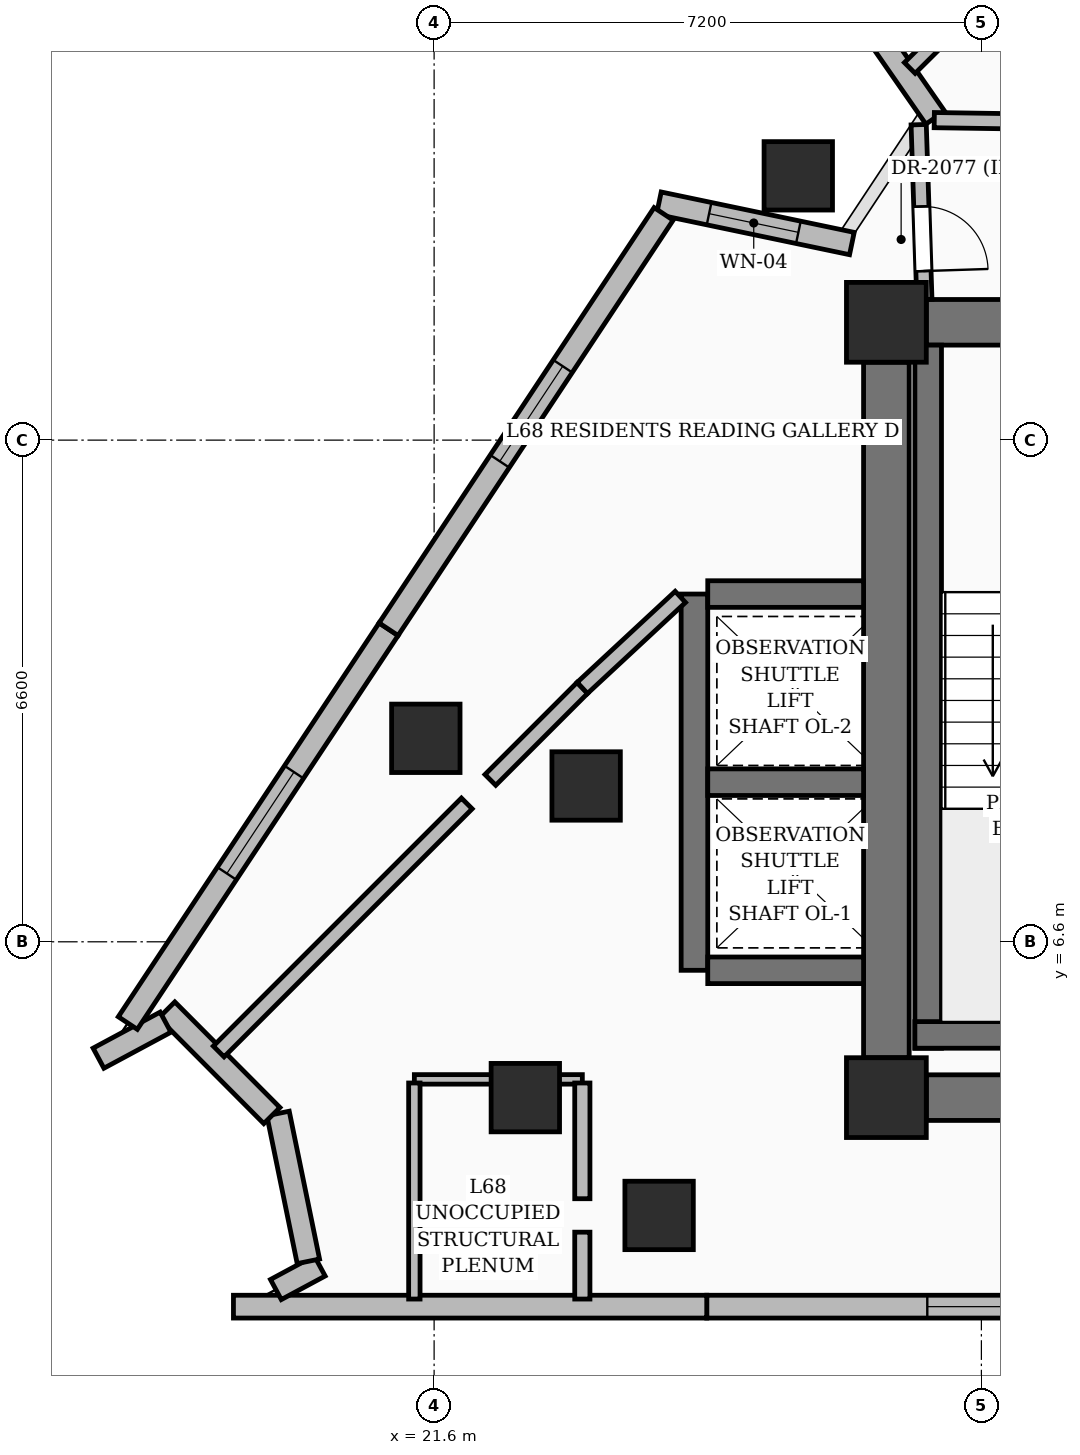
"""IFC4 building model, lengths in metres.
Left out: names, types, materials, properties, quantities, classifications, styles, units other than length and angle.
Written with IfcOpenShell. Run it as: python <this file> out.ifc"""

import sys

from ifc_helpers import new_model, si_unit, direction, frame, frame_2d, origin, origin_2d, place, context, subcontext, project, spatial, rectangle, extrude, element, fill, save


model = new_model("IFC4")
c1 = context("Model", 3, precision=1e-05, world=origin(), true_north=direction((0.0, 1.0)))
c2 = subcontext(c1, "Body", "Model", "MODEL_VIEW")
j1 = project(units=[si_unit("LENGTHUNIT", "METRE"), si_unit("PLANEANGLEUNIT", "RADIAN")], contexts=[c1])
p1 = place(None, origin())
s1 = spatial("IfcSite", under=j1, at=p1, CompositionType="ELEMENT")
p2 = place(p1, origin())
s2 = spatial("IfcBuilding", under=s1, at=p2, CompositionType="ELEMENT")
p3 = place(p2, frame((0.0, 0.0, 263.25)))
s3 = spatial("IfcBuildingStorey", under=s2, at=p3, CompositionType="ELEMENT", Elevation=263.25)
for number, where, z_axis, x_axis in (
    (1, (27.55, 4.55, 0.0), (0.0, 0.0, 1.0), (1.0, 0.0, 0.0)),
    (2, (27.55, 14.75, 0.0), (0.0, 0.0, 1.0), (1.0, 0.0, 0.0)),
):
    element("IfcColumn", number, at=place(p3, frame(where, z_axis=z_axis, x_axis=x_axis)), inside=s3, PredefinedType="COLUMN", context=c2, shape_type="SweptSolid", body=[
        extrude(rectangle(XDim=1.05, YDim=1.05, at=origin_2d()), origin(), (0.0, 0.0, 1.0), 3.75),
    ])
for number, where, z_axis, x_axis in (
    (3, (22.8, 4.55, 0.0), (0.0, 0.0, 1.0), (1.0, 0.0, 0.0)),
    (4, (23.6, 8.65, 0.0), (0.0, 0.0, 1.0), (1.0, 0.0, 0.0)),
):
    element("IfcColumn", number, at=place(p3, frame(where, z_axis=z_axis, x_axis=x_axis)), inside=s3, PredefinedType="COLUMN", context=c2, shape_type="SweptSolid", body=[
        extrude(rectangle(XDim=0.9, YDim=0.9, at=origin_2d()), origin(), (0.0, 0.0, 1.0), 3.75),
    ])
p4 = place(p3, frame((28.075, 4.55, 0.0), z_axis=(0.0, 0.0, 1.0), x_axis=(1.0, 0.0, 0.0)))
e5 = element("IfcWall", 5, at=p4, inside=s3, PredefinedType="SHEAR", context=c2, shape_type="SweptSolid", body=[
    extrude(rectangle(XDim=6.55, YDim=0.6, at=frame_2d((3.275, 0.0))), origin(), (0.0, 0.0, 1.0), 3.75),
])
p5 = place(p3, frame((28.075, 14.75, 0.0), z_axis=(0.0, 0.0, 1.0), x_axis=(1.0, 0.0, 0.0)))
e6 = element("IfcWall", 6, at=p5, inside=s3, PredefinedType="SHEAR", context=c2, shape_type="SweptSolid", body=[
    extrude(rectangle(XDim=6.55, YDim=0.6, at=frame_2d((3.275, 0.0))), origin(), (0.0, 0.0, 1.0), 3.75),
])
p6 = place(p5, frame((1.1, 0.0, 0.0)))
e7 = element("IfcOpeningElement", 7, at=p6, cuts=e6, PredefinedType="OPENING", context=c2, shape_type="SweptSolid", body=[
    extrude(rectangle(XDim=1.05, YDim=2.15, at=frame_2d((0.525, 1.075))), frame((0.0, 0.31, 0.0), z_axis=(0.0, -1.0, 0.0), x_axis=(1.0, 0.0, 0.0)), (0.0, 0.0, 1.0), 0.62),
])
p7 = place(p5, frame((4.95, 0.0, 0.0)))
e8 = element("IfcOpeningElement", 8, at=p7, cuts=e6, PredefinedType="OPENING", context=c2, shape_type="SweptSolid", body=[
    extrude(rectangle(XDim=0.95, YDim=2.15, at=frame_2d((0.475, 1.075))), frame((0.0, 0.31, 0.0), z_axis=(0.0, -1.0, 0.0), x_axis=(1.0, 0.0, 0.0)), (0.0, 0.0, 1.0), 0.62),
])
p8 = place(p3, frame((27.55, 5.075, 0.0), z_axis=(0.0, 0.0, 1.0), x_axis=(0.0, 1.0, 0.0)))
e9 = element("IfcWall", 9, at=p8, inside=s3, PredefinedType="SHEAR", context=c2, shape_type="SweptSolid", body=[
    extrude(rectangle(XDim=9.15, YDim=0.6, at=frame_2d((4.575, 0.0))), origin(), (0.0, 0.0, 1.0), 3.75),
])
p9 = place(p3, frame((28.1, 5.2, 0.0), z_axis=(0.0, 0.0, 1.0), x_axis=(0.0, 1.0, 0.0)))
e10 = element("IfcWall", 10, at=p9, inside=s3, PredefinedType="SOLIDWALL", context=c2, shape_type="SweptSolid", body=[
    extrude(rectangle(XDim=9.25, YDim=0.35, at=frame_2d((4.625, 0.0))), origin(), (0.0, 0.0, 1.0), 3.75),
])
p10 = place(p3, frame((27.925, 5.375, 0.0), z_axis=(0.0, 0.0, 1.0), x_axis=(1.0, 0.0, 0.0)))
e11 = element("IfcWall", 11, at=p10, inside=s3, PredefinedType="SOLIDWALL", context=c2, shape_type="SweptSolid", body=[
    extrude(rectangle(XDim=3.55, YDim=0.35, at=frame_2d((1.775, 0.0))), origin(), (0.0, 0.0, 1.0), 3.75),
])
p11 = place(p3, frame((25.025, 6.225, 0.0), z_axis=(0.0, 0.0, 1.0), x_axis=(0.0, 1.0, 0.0)))
e12 = element("IfcWall", 12, at=p11, inside=s3, PredefinedType="SOLIDWALL", context=c2, shape_type="SweptSolid", body=[
    extrude(rectangle(XDim=4.95, YDim=0.35, at=frame_2d((2.475, 0.0))), origin(), (0.0, 0.0, 1.0), 3.75),
])
for number, where, z_axis, x_axis in (
    (13, (25.2, 6.225, 0.0), (0.0, 0.0, 1.0), (1.0, 0.0, 0.0)),
    (14, (25.2, 8.7, 0.0), (0.0, 0.0, 1.0), (1.0, 0.0, 0.0)),
    (15, (25.2, 11.175, 0.0), (0.0, 0.0, 1.0), (1.0, 0.0, 0.0)),
):
    element("IfcWall", number, at=place(p3, frame(where, z_axis=z_axis, x_axis=x_axis)), inside=s3, PredefinedType="SOLIDWALL", context=c2, shape_type="SweptSolid", body=[
        extrude(rectangle(XDim=2.05, YDim=0.35, at=frame_2d((1.025, 0.0))), origin(), (0.0, 0.0, 1.0), 3.75),
    ])
for number, where, z_axis, x_axis in (
    (16, (24.56, 3.0, 0.0), (0.0, 0.0, 1.0), (1.0, 0.0, 0.0)),
    (17, (26.391, 16.677, 0.0), (0.0, 0.0, 1.0), (1.0, 0.0, 0.0)),
    (18, (21.491, 9.277, 0.0), (0.0, 0.0, 1.0), (1.0, 0.0, 0.0)),
):
    element("IfcColumn", number, at=place(p3, frame(where, z_axis=z_axis, x_axis=x_axis)), inside=s3, PredefinedType="COLUMN", context=c2, shape_type="SweptSolid", body=[
        extrude(rectangle(XDim=0.9, YDim=0.9, at=origin_2d()), origin(), (0.0, 0.0, 1.0), 3.75),
    ])
p12 = place(p3, frame((24.557, 16.318, 0.0), z_axis=(0.0, 0.0, 1.0), x_axis=(0.978804667181, -0.204796053441, 0.0)))
e19 = element("IfcWall", 19, at=p12, inside=s3, PredefinedType="SOLIDWALL", context=c2, shape_type="SweptSolid", body=[
    extrude(rectangle(XDim=2.594, YDim=0.3, at=frame_2d((1.297, 0.0))), origin(), (0.0, 0.0, 1.0), 2.825),
])
p13 = place(p12, frame((0.675, 0.0, 0.8)))
e20 = element("IfcOpeningElement", 20, at=p13, cuts=e19, PredefinedType="OPENING", context=c2, shape_type="SweptSolid", body=[
    extrude(rectangle(XDim=1.2, YDim=1.8, at=frame_2d((0.6, 0.9))), frame((0.0, 0.16, 0.0), z_axis=(0.0, -1.0, 0.0), x_axis=(1.0, 0.0, 0.0)), (0.0, 0.0, 1.0), 0.32),
])
p14 = place(p3, frame((28.193, 17.443, 0.0), z_axis=(0.0, 0.0, 1.0), x_axis=(-0.570819039355, 0.821075894367, 0.0)))
e21 = element("IfcWall", 21, at=p14, inside=s3, PredefinedType="SOLIDWALL", context=c2, shape_type="SweptSolid", body=[
    extrude(rectangle(XDim=2.594, YDim=0.3, at=frame_2d((1.297, 0.0))), origin(), (0.0, 0.0, 1.0), 2.825),
])
p15 = place(p3, frame((31.413, 1.8, 0.0), z_axis=(0.0, 0.0, 1.0), x_axis=(-1.0, 0.0, 0.0)))
e22 = element("IfcWall", 22, at=p15, inside=s3, PredefinedType="SOLIDWALL", context=c2, shape_type="SweptSolid", body=[
    extrude(rectangle(XDim=6.227, YDim=0.3, at=frame_2d((3.113, 0.0))), origin(), (0.0, 0.0, 1.0), 3.5),
])
p16 = place(p15, frame((1.725, 0.0, 0.55)))
e23 = element("IfcOpeningElement", 23, at=p16, cuts=e22, PredefinedType="OPENING", context=c2, shape_type="SweptSolid", body=[
    extrude(rectangle(XDim=1.6, YDim=2.2, at=frame_2d((0.8, 1.1))), frame((0.0, 0.16, 0.0), z_axis=(0.0, -1.0, 0.0), x_axis=(1.0, 0.0, 0.0)), (0.0, 0.0, 1.0), 0.32),
])
p17 = place(p3, frame((25.187, 1.8, 0.0), z_axis=(0.0, 0.0, 1.0), x_axis=(-1.0, 0.0, 0.0)))
e24 = element("IfcWall", 24, at=p17, inside=s3, PredefinedType="SOLIDWALL", context=c2, shape_type="SweptSolid", body=[
    extrude(rectangle(XDim=6.227, YDim=0.3, at=frame_2d((3.113, 0.0))), origin(), (0.0, 0.0, 1.0), 3.5),
])
p18 = place(p3, frame((19.518, 2.025, 0.0), z_axis=(0.0, 0.0, 1.0), x_axis=(0.8806864219, 0.47369972164, 0.0)))
e25 = element("IfcWall", 25, at=p18, inside=s3, PredefinedType="SOLIDWALL", context=c2, shape_type="SweptSolid", body=[
    extrude(rectangle(XDim=0.655, YDim=0.3, at=frame_2d((0.328, 0.0))), origin(), (0.0, 0.0, 1.0), 3.5),
])
p19 = place(p3, frame((19.946, 2.396, 0.0), z_axis=(0.0, 0.0, 1.0), x_axis=(-0.200962300898, 0.979598975917, 0.0)))
e26 = element("IfcWall", 26, at=p19, inside=s3, PredefinedType="SOLIDWALL", context=c2, shape_type="SweptSolid", body=[
    extrude(rectangle(XDim=1.985, YDim=0.3, at=frame_2d((0.993, 0.0))), origin(), (0.0, 0.0, 1.0), 3.5),
])
p20 = place(p3, frame((19.466, 4.314, 0.0), z_axis=(0.0, 0.0, 1.0), x_axis=(-0.705548527825, 0.708661608163, 0.0)))
e27 = element("IfcWall", 27, at=p20, inside=s3, PredefinedType="SOLIDWALL", context=c2, shape_type="SweptSolid", body=[
    extrude(rectangle(XDim=1.961, YDim=0.3, at=frame_2d((0.98, 0.0))), origin(), (0.0, 0.0, 1.0), 3.5),
])
p21 = place(p3, frame((18.066, 5.542, 0.0), z_axis=(0.0, 0.0, 1.0), x_axis=(-0.880815496191, -0.473459672696, 0.0)))
e28 = element("IfcWall", 28, at=p21, inside=s3, PredefinedType="SOLIDWALL", context=c2, shape_type="SweptSolid", body=[
    extrude(rectangle(XDim=1.001, YDim=0.3, at=frame_2d((0.5, 0.0))), origin(), (0.0, 0.0, 1.0), 3.5),
])
p22 = place(p3, frame((17.57, 5.531, 0.0), z_axis=(0.0, 0.0, 1.0), x_axis=(0.552104356314, 0.833775017459, 0.0)))
e29 = element("IfcWall", 29, at=p22, inside=s3, PredefinedType="SOLIDWALL", context=c2, shape_type="SweptSolid", body=[
    extrude(rectangle(XDim=6.214, YDim=0.3, at=frame_2d((3.107, 0.0))), origin(), (0.0, 0.0, 1.0), 3.5),
])
p23 = place(p22, frame((2.36, 0.0, 0.55)))
e30 = element("IfcOpeningElement", 30, at=p23, cuts=e29, PredefinedType="OPENING", context=c2, shape_type="SweptSolid", body=[
    extrude(rectangle(XDim=1.6, YDim=2.2, at=frame_2d((0.8, 1.1))), frame((0.0, 0.16, 0.0), z_axis=(0.0, -1.0, 0.0), x_axis=(1.0, 0.0, 0.0)), (0.0, 0.0, 1.0), 0.32),
])
p24 = place(p3, frame((21.001, 10.712, 0.0), z_axis=(0.0, 0.0, 1.0), x_axis=(0.552092793922, 0.833782673662, 0.0)))
e31 = element("IfcWall", 31, at=p24, inside=s3, PredefinedType="SOLIDWALL", context=c2, shape_type="SweptSolid", body=[
    extrude(rectangle(XDim=6.554, YDim=0.3, at=frame_2d((3.277, 0.0))), origin(), (0.0, 0.0, 1.0), 3.5),
])
p25 = place(p24, frame((2.65, 0.0, 0.6)))
e32 = element("IfcOpeningElement", 32, at=p25, cuts=e31, PredefinedType="OPENING", context=c2, shape_type="SweptSolid", body=[
    extrude(rectangle(XDim=1.5, YDim=2.1, at=frame_2d((0.75, 1.05))), frame((0.0, 0.16, 0.0), z_axis=(0.0, -1.0, 0.0), x_axis=(1.0, 0.0, 0.0)), (0.0, 0.0, 1.0), 0.32),
])
p26 = place(p3, frame((27.975, 17.35, 0.0), z_axis=(0.0, 0.0, 1.0), x_axis=(0.032569486082, -0.999469473559, 0.0)))
e33 = element("IfcWall", 33, at=p26, inside=s3, PredefinedType="PARTITIONING", context=c2, shape_type="SweptSolid", body=[
    extrude(rectangle(XDim=2.301, YDim=0.2, at=frame_2d((1.151, 0.0))), origin(), (0.0, 0.0, 1.0), 3.5),
])
p27 = place(p26, frame((1.077, 0.0, 0.0)))
e34 = element("IfcOpeningElement", 34, at=p27, cuts=e33, PredefinedType="OPENING", context=c2, shape_type="SweptSolid", body=[
    extrude(rectangle(XDim=0.85, YDim=2.1, at=frame_2d((0.425, 1.05))), frame((0.0, 0.11, 0.0), z_axis=(0.0, -1.0, 0.0), x_axis=(1.0, 0.0, 0.0)), (0.0, 0.0, 1.0), 0.22),
])
p28 = place(p3, frame((32.19, 17.35, 0.0), z_axis=(0.0, 0.0, 1.0), x_axis=(-0.999888770764, 0.014914627022, 0.0)))
e35 = element("IfcWall", 35, at=p28, inside=s3, PredefinedType="PARTITIONING", context=c2, shape_type="SweptSolid", body=[
    extrude(rectangle(XDim=4.01, YDim=0.2, at=frame_2d((2.005, 0.0))), origin(), (0.0, 0.0, 1.0), 3.5),
])
p29 = place(p3, frame((21.34, 4.79, 0.0), z_axis=(0.0, 0.0, 1.0), x_axis=(1.0, 0.0, 0.0)))
e36 = element("IfcWall", 36, at=p29, inside=s3, PredefinedType="PARTITIONING", context=c2, shape_type="SweptSolid", body=[
    extrude(rectangle(XDim=2.21, YDim=0.125, at=frame_2d((1.105, 0.0))), origin(), (0.0, 0.0, 1.0), 2.685),
])
p30 = place(p3, frame((22.03, 8.42, 0.0), z_axis=(0.0, 0.0, 1.0), x_axis=(-0.707212572145, -0.707000974398, 0.0)))
e37 = element("IfcWall", 37, at=p30, inside=s3, PredefinedType="PARTITIONING", context=c2, shape_type="SweptSolid", body=[
    extrude(rectangle(XDim=4.615, YDim=0.2, at=frame_2d((2.308, 0.0))), origin(), (0.0, 0.0, 1.0), 2.82),
])
p31 = place(p3, frame((23.55, 9.94, 0.0), z_axis=(0.0, 0.0, 1.0), x_axis=(-0.707106781187, -0.707106781187, 0.0)))
e38 = element("IfcWall", 38, at=p31, inside=s3, PredefinedType="PARTITIONING", context=c2, shape_type="SweptSolid", body=[
    extrude(rectangle(XDim=1.711, YDim=0.2, at=frame_2d((0.855, 0.0))), origin(), (0.0, 0.0, 1.0), 2.764),
])
p32 = place(p3, frame((21.34, 4.742, 0.0), z_axis=(0.0, 0.0, 1.0), x_axis=(0.0, -1.0, 0.0)))
e39 = element("IfcWall", 39, at=p32, inside=s3, PredefinedType="PARTITIONING", context=c2, shape_type="SweptSolid", body=[
    extrude(rectangle(XDim=2.843, YDim=0.15, at=frame_2d((1.421, 0.0))), origin(), (0.0, 0.0, 1.0), 3.5),
])
p33 = place(p3, frame((23.55, 1.9, 0.0), z_axis=(0.0, 0.0, 1.0), x_axis=(0.0, 1.0, 0.0)))
e40 = element("IfcWall", 40, at=p33, inside=s3, PredefinedType="PARTITIONING", context=c2, shape_type="SweptSolid", body=[
    extrude(rectangle(XDim=0.88, YDim=0.2, at=frame_2d((0.44, 0.0))), origin(), (0.0, 0.0, 1.0), 3.5),
])
p34 = place(p3, frame((23.55, 3.22, 0.0), z_axis=(0.0, 0.0, 1.0), x_axis=(0.0, 1.0, 0.0)))
e41 = element("IfcWall", 41, at=p34, inside=s3, PredefinedType="PARTITIONING", context=c2, shape_type="SweptSolid", body=[
    extrude(rectangle(XDim=1.522, YDim=0.2, at=frame_2d((0.761, 0.0))), origin(), (0.0, 0.0, 1.0), 2.685),
])
p35 = place(p3, frame((24.839, 11.137, 0.0), z_axis=(0.0, 0.0, 1.0), x_axis=(-0.732709479124, -0.68054156317, 0.0)))
e42 = element("IfcWall", 42, at=p35, inside=s3, PredefinedType="PARTITIONING", context=c2, shape_type="SweptSolid", body=[
    extrude(rectangle(XDim=1.76, YDim=0.2, at=frame_2d((0.88, 0.0))), origin(), (0.0, 0.0, 1.0), 3.5),
])
p36 = place(p3, frame((32.147, 22.358, 0.0), z_axis=(0.0, 0.0, 1.0), x_axis=(-0.709404461914, -0.70480160997, 0.0)))
e43 = element("IfcWall", 43, at=p36, inside=s3, PredefinedType="PARTITIONING", context=c2, shape_type="SweptSolid", body=[
    extrude(rectangle(XDim=6.047, YDim=0.2, at=frame_2d((3.023, 0.0))), origin(), (0.0, 0.0, 1.0), 2.764),
])
p37 = place(p13, origin())
e44 = element("IfcWindow", 44, at=p37, inside=s3, PartitioningType="SINGLE_PANEL", PredefinedType="WINDOW", context=c2, shape_type="SweptSolid", body=[
    extrude(rectangle(XDim=1.2, YDim=1.8, at=frame_2d((0.6, 0.9))), frame((0.0, 0.03, 0.0), z_axis=(0.0, -1.0, 0.0), x_axis=(1.0, 0.0, 0.0)), (0.0, 0.0, 1.0), 0.06),
])
fill(e20, e44)
p38 = place(p16, origin())
e45 = element("IfcWindow", 45, at=p38, inside=s3, PartitioningType="SINGLE_PANEL", PredefinedType="WINDOW", context=c2, shape_type="SweptSolid", body=[
    extrude(rectangle(XDim=1.6, YDim=2.2, at=frame_2d((0.8, 1.1))), frame((0.0, 0.03, 0.0), z_axis=(0.0, -1.0, 0.0), x_axis=(1.0, 0.0, 0.0)), (0.0, 0.0, 1.0), 0.06),
])
fill(e23, e45)
p39 = place(p23, origin())
e46 = element("IfcWindow", 46, at=p39, inside=s3, PartitioningType="SINGLE_PANEL", PredefinedType="WINDOW", context=c2, shape_type="SweptSolid", body=[
    extrude(rectangle(XDim=1.6, YDim=2.2, at=frame_2d((0.8, 1.1))), frame((0.0, 0.03, 0.0), z_axis=(0.0, -1.0, 0.0), x_axis=(1.0, 0.0, 0.0)), (0.0, 0.0, 1.0), 0.06),
])
fill(e30, e46)
p40 = place(p25, origin())
e47 = element("IfcWindow", 47, at=p40, inside=s3, PartitioningType="SINGLE_PANEL", PredefinedType="WINDOW", context=c2, shape_type="SweptSolid", body=[
    extrude(rectangle(XDim=1.5, YDim=2.1, at=frame_2d((0.75, 1.05))), frame((0.0, 0.03, 0.0), z_axis=(0.0, -1.0, 0.0), x_axis=(1.0, 0.0, 0.0)), (0.0, 0.0, 1.0), 0.06),
])
fill(e32, e47)
p41 = place(p27, origin())
e48 = element("IfcDoor", 48, at=p41, inside=s3, OperationType="SINGLE_SWING_RIGHT", PredefinedType="DOOR", context=c2, shape_type="SweptSolid", body=[
    extrude(rectangle(XDim=0.85, YDim=2.1, at=frame_2d((0.425, 1.05))), frame((0.0, 0.025, 0.0), z_axis=(0.0, -1.0, 0.0), x_axis=(1.0, 0.0, 0.0)), (0.0, 0.0, 1.0), 0.05),
])
fill(e34, e48)
save(model, sys.argv[1])
